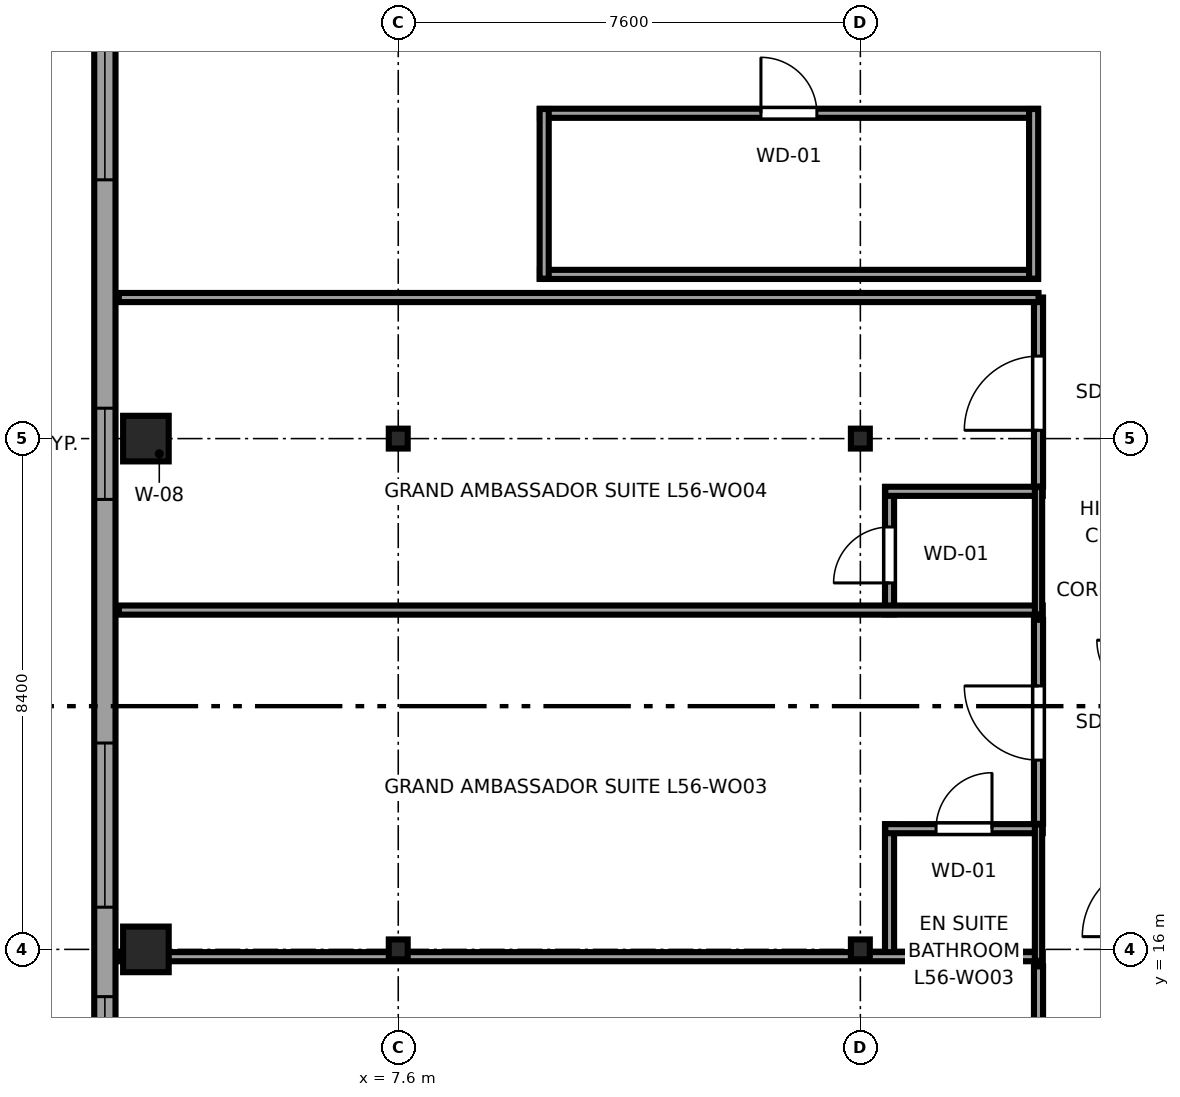
"""IFC4 building model, lengths in metres.
Left out: names, types, materials, properties, quantities, classifications, styles, units other than length and angle.
Written with IfcOpenShell. Run it as: python <this file> out.ifc"""

import sys

from ifc_helpers import new_model, si_unit, direction, frame, frame_2d, origin, origin_2d, place, context, subcontext, project, spatial, rectangle, i_section, extrude, source, transform, mapped, element, fill, save


model = new_model("IFC4")
c1 = context("Model", 3, precision=1e-05, world=origin(), true_north=direction((0.0, 1.0)))
c2 = subcontext(c1, "Body", "Model", "MODEL_VIEW")
j1 = project(units=[si_unit("LENGTHUNIT", "METRE"), si_unit("PLANEANGLEUNIT", "RADIAN")], contexts=[c1])
p1 = place(None, origin())
s1 = spatial("IfcSite", under=j1, at=p1, CompositionType="ELEMENT")
p2 = place(p1, origin())
s2 = spatial("IfcBuilding", under=s1, at=p2, CompositionType="ELEMENT")
p3 = place(p2, frame((0.0, 0.0, 213.25)))
s3 = spatial("IfcBuildingStorey", under=s2, at=p3, CompositionType="ELEMENT", Elevation=213.25)
m1 = source(origin(), c2, "Body", "SweptSolid", [
    extrude(rectangle(XDim=0.75, YDim=0.75, at=origin_2d()), origin(), (0.0, 0.0, 1.0), 3.55),
])
for number, where, z_axis, x_axis in (
    (1, (3.45, 16.0, 0.0), (0.0, 0.0, 1.0), (1.0, 0.0, 0.0)),
    (2, (3.45, 24.4, 0.0), (0.0, 0.0, 1.0), (1.0, 0.0, 0.0)),
):
    element("IfcColumn", number, at=place(p3, frame(where, z_axis=z_axis, x_axis=x_axis)), inside=s3, PredefinedType="COLUMN", context=c2, shape_type="MappedRepresentation", body=[
        mapped(m1, transform((0.0, 0.0, 0.0), x_axis=(1.0, 0.0, 0.0), y_axis=(0.0, 1.0, 0.0), z_axis=(0.0, 0.0, 1.0), scale=1.0)),
    ])
m2 = source(origin(), c2, "Body", "SweptSolid", [
    extrude(i_section(OverallWidth=0.311, OverallDepth=0.327, WebThickness=0.016, FlangeThickness=0.025, FilletRadius=0.017, at=origin_2d()), origin(), (0.0, 0.0, 1.0), 3.55),
])
for number, where, z_axis, x_axis in (
    (3, (7.6, 16.0, 0.0), (0.0, 0.0, 1.0), (1.0, 0.0, 0.0)),
    (4, (7.6, 24.4, 0.0), (0.0, 0.0, 1.0), (1.0, 0.0, 0.0)),
    (5, (15.2, 16.0, 0.0), (0.0, 0.0, 1.0), (1.0, 0.0, 0.0)),
    (6, (15.2, 24.4, 0.0), (0.0, 0.0, 1.0), (1.0, 0.0, 0.0)),
):
    element("IfcColumn", number, at=place(p3, frame(where, z_axis=z_axis, x_axis=x_axis)), inside=s3, PredefinedType="COLUMN", context=c2, shape_type="MappedRepresentation", body=[
        mapped(m2, transform((0.0, 0.0, 0.0), x_axis=(1.0, 0.0, 0.0), y_axis=(0.0, 1.0, 0.0), z_axis=(0.0, 0.0, 1.0), scale=1.0)),
    ])
p4 = place(p3, frame((2.775, 41.583, 0.0), z_axis=(0.0, 0.0, 1.0), x_axis=(0.0, -1.0, 0.0)))
e7 = element("IfcWall", 7, at=p4, inside=s3, PredefinedType="SOLIDWALL", context=c2, shape_type="SweptSolid", body=[
    extrude(rectangle(XDim=34.566, YDim=0.35, at=frame_2d((17.283, 0.0))), origin(), (0.0, 0.0, 1.0), 3.37),
])
p5 = place(p4, frame((10.227, 0.0, 0.68)))
e8 = element("IfcOpeningElement", 8, at=p5, cuts=e7, PredefinedType="OPENING", context=c2, shape_type="SweptSolid", body=[
    extrude(rectangle(XDim=2.7, YDim=1.95, at=frame_2d((1.35, 0.975))), frame((0.0, 0.185, 0.0), z_axis=(0.0, -1.0, 0.0), x_axis=(1.0, 0.0, 0.0)), (0.0, 0.0, 1.0), 0.37),
])
p6 = place(p4, frame((22.189, 0.0, 0.68)))
e9 = element("IfcOpeningElement", 9, at=p6, cuts=e7, PredefinedType="OPENING", context=c2, shape_type="SweptSolid", body=[
    extrude(rectangle(XDim=2.7, YDim=1.95, at=frame_2d((1.35, 0.975))), frame((0.0, 0.185, 0.0), z_axis=(0.0, -1.0, 0.0), x_axis=(1.0, 0.0, 0.0)), (0.0, 0.0, 1.0), 0.37),
])
p7 = place(p4, frame((26.36, 0.0, 0.68)))
e10 = element("IfcOpeningElement", 10, at=p7, cuts=e7, PredefinedType="OPENING", context=c2, shape_type="SweptSolid", body=[
    extrude(rectangle(XDim=2.7, YDim=1.95, at=frame_2d((1.35, 0.975))), frame((0.0, 0.185, 0.0), z_axis=(0.0, -1.0, 0.0), x_axis=(1.0, 0.0, 0.0)), (0.0, 0.0, 1.0), 0.37),
])
p8 = place(p4, frame((29.48, 0.0, 0.68)))
e11 = element("IfcOpeningElement", 11, at=p8, cuts=e7, PredefinedType="OPENING", context=c2, shape_type="SweptSolid", body=[
    extrude(rectangle(XDim=2.7, YDim=1.95, at=frame_2d((1.35, 0.975))), frame((0.0, 0.185, 0.0), z_axis=(0.0, -1.0, 0.0), x_axis=(1.0, 0.0, 0.0)), (0.0, 0.0, 1.0), 0.37),
])
p9 = place(p4, frame((16.683, 0.0, 0.62)))
e12 = element("IfcOpeningElement", 12, at=p9, cuts=e7, PredefinedType="OPENING", context=c2, shape_type="SweptSolid", body=[
    extrude(rectangle(XDim=1.5, YDim=1.55, at=frame_2d((0.75, 0.775))), frame((0.0, 0.185, 0.0), z_axis=(0.0, -1.0, 0.0), x_axis=(1.0, 0.0, 0.0)), (0.0, 0.0, 1.0), 0.37),
])
p10 = place(p3, frame((15.68, 15.81, 0.0), z_axis=(0.0, 0.0, 1.0), x_axis=(0.0, 1.0, 0.0)))
e13 = element("IfcWall", 13, at=p10, inside=s3, PredefinedType="PARTITIONING", context=c2, shape_type="SweptSolid", body=[
    extrude(rectangle(XDim=2.245, YDim=0.15, at=frame_2d((1.123, 0.0))), origin(), (0.0, 0.0, 1.0), 3.37),
])
p11 = place(p3, frame((3.005, 15.88, 0.0), z_axis=(0.0, 0.0, 1.0), x_axis=(1.0, 0.0, 0.0)))
e14 = element("IfcWall", 14, at=p11, inside=s3, PredefinedType="PARTITIONING", context=c2, shape_type="SweptSolid", body=[
    extrude(rectangle(XDim=15.195, YDim=0.15, at=frame_2d((7.598, 0.0))), origin(), (0.0, 0.0, 1.0), 2.758),
])
p12 = place(p3, frame((15.61, 17.985, 0.0), z_axis=(0.0, 0.0, 1.0), x_axis=(1.0, 0.0, 0.0)))
e15 = element("IfcWall", 15, at=p12, inside=s3, PredefinedType="PARTITIONING", context=c2, shape_type="SweptSolid", body=[
    extrude(rectangle(XDim=2.59, YDim=0.15, at=frame_2d((1.295, 0.0))), origin(), (0.0, 0.0, 1.0), 3.37),
])
p13 = place(p12, frame((0.835, 0.0, 0.0)))
e16 = element("IfcOpeningElement", 16, at=p13, cuts=e15, PredefinedType="OPENING", context=c2, shape_type="SweptSolid", body=[
    extrude(rectangle(XDim=0.92, YDim=2.01, at=frame_2d((0.46, 1.005))), frame((0.0, 0.085, 0.0), z_axis=(0.0, -1.0, 0.0), x_axis=(1.0, 0.0, 0.0)), (0.0, 0.0, 1.0), 0.17),
])
p14 = place(p3, frame((18.13, 15.81, 0.0), z_axis=(0.0, 0.0, 1.0), x_axis=(0.0, 1.0, 0.0)))
e17 = element("IfcWall", 17, at=p14, inside=s3, PredefinedType="PLUMBINGWALL", context=c2, shape_type="SweptSolid", body=[
    extrude(rectangle(XDim=2.245, YDim=0.12, at=frame_2d((1.123, 0.0))), origin(), (0.0, 0.0, 1.0), 3.37),
])
p15 = place(p3, frame((15.68, 21.51, 0.0), z_axis=(0.0, 0.0, 1.0), x_axis=(0.0, 1.0, 0.0)))
e18 = element("IfcWall", 18, at=p15, inside=s3, PredefinedType="PARTITIONING", context=c2, shape_type="SweptSolid", body=[
    extrude(rectangle(XDim=2.093, YDim=0.15, at=frame_2d((1.046, 0.0))), origin(), (0.0, 0.0, 1.0), 3.37),
])
p16 = place(p15, frame((0.517, 0.0, 0.0)))
e19 = element("IfcOpeningElement", 19, at=p16, cuts=e18, PredefinedType="OPENING", context=c2, shape_type="SweptSolid", body=[
    extrude(rectangle(XDim=0.92, YDim=2.01, at=frame_2d((0.46, 1.005))), frame((0.0, 0.085, 0.0), z_axis=(0.0, -1.0, 0.0), x_axis=(1.0, 0.0, 0.0)), (0.0, 0.0, 1.0), 0.17),
])
p17 = place(p3, frame((3.005, 21.58, 0.0), z_axis=(0.0, 0.0, 1.0), x_axis=(1.0, 0.0, 0.0)))
e20 = element("IfcWall", 20, at=p17, inside=s3, PredefinedType="PARTITIONING", context=c2, shape_type="SweptSolid", body=[
    extrude(rectangle(XDim=15.195, YDim=0.15, at=frame_2d((7.598, 0.0))), origin(), (0.0, 0.0, 1.0), 3.37),
])
p18 = place(p3, frame((15.61, 23.533, 0.0), z_axis=(0.0, 0.0, 1.0), x_axis=(1.0, 0.0, 0.0)))
e21 = element("IfcWall", 21, at=p18, inside=s3, PredefinedType="PARTITIONING", context=c2, shape_type="SweptSolid", body=[
    extrude(rectangle(XDim=2.59, YDim=0.15, at=frame_2d((1.295, 0.0))), origin(), (0.0, 0.0, 1.0), 3.37),
])
p19 = place(p3, frame((18.13, 21.51, 0.0), z_axis=(0.0, 0.0, 1.0), x_axis=(0.0, 1.0, 0.0)))
e22 = element("IfcWall", 22, at=p19, inside=s3, PredefinedType="PLUMBINGWALL", context=c2, shape_type="SweptSolid", body=[
    extrude(rectangle(XDim=2.093, YDim=0.12, at=frame_2d((1.046, 0.0))), origin(), (0.0, 0.0, 1.0), 3.37),
])
p20 = place(p3, frame((18.13, 11.01, 0.0), z_axis=(0.0, 0.0, 1.0), x_axis=(0.0, 1.0, 0.0)))
e23 = element("IfcWall", 23, at=p20, inside=s3, PredefinedType="PARTITIONING", context=c2, shape_type="SweptSolid", body=[
    extrude(rectangle(XDim=4.71, YDim=0.15, at=frame_2d((2.355, 0.0))), origin(), (0.0, 0.0, 1.0), 3.37),
])
p21 = place(p20, frame((1.725, 0.0, 0.0)))
e24 = element("IfcOpeningElement", 24, at=p21, cuts=e23, PredefinedType="OPENING", context=c2, shape_type="SweptSolid", body=[
    extrude(rectangle(XDim=1.22, YDim=2.08, at=frame_2d((0.61, 1.04))), frame((0.0, 0.085, 0.0), z_axis=(0.0, -1.0, 0.0), x_axis=(1.0, 0.0, 0.0)), (0.0, 0.0, 1.0), 0.17),
])
p22 = place(p3, frame((18.13, 18.065, 0.0), z_axis=(0.0, 0.0, 1.0), x_axis=(0.0, 1.0, 0.0)))
e25 = element("IfcWall", 25, at=p22, inside=s3, PredefinedType="PARTITIONING", context=c2, shape_type="SweptSolid", body=[
    extrude(rectangle(XDim=3.355, YDim=0.15, at=frame_2d((1.677, 0.0))), origin(), (0.0, 0.0, 1.0), 3.37),
])
p23 = place(p22, frame((1.048, 0.0, 0.0)))
e26 = element("IfcOpeningElement", 26, at=p23, cuts=e25, PredefinedType="OPENING", context=c2, shape_type="SweptSolid", body=[
    extrude(rectangle(XDim=1.22, YDim=2.08, at=frame_2d((0.61, 1.04))), frame((0.0, 0.085, 0.0), z_axis=(0.0, -1.0, 0.0), x_axis=(1.0, 0.0, 0.0)), (0.0, 0.0, 1.0), 0.17),
])
p24 = place(p3, frame((18.13, 23.613, 0.0), z_axis=(0.0, 0.0, 1.0), x_axis=(0.0, 1.0, 0.0)))
e27 = element("IfcWall", 27, at=p24, inside=s3, PredefinedType="PARTITIONING", context=c2, shape_type="SweptSolid", body=[
    extrude(rectangle(XDim=3.107, YDim=0.15, at=frame_2d((1.553, 0.0))), origin(), (0.0, 0.0, 1.0), 3.37),
])
p25 = place(p24, frame((0.924, 0.0, 0.0)))
e28 = element("IfcOpeningElement", 28, at=p25, cuts=e27, PredefinedType="OPENING", context=c2, shape_type="SweptSolid", body=[
    extrude(rectangle(XDim=1.22, YDim=2.08, at=frame_2d((0.61, 1.04))), frame((0.0, 0.085, 0.0), z_axis=(0.0, -1.0, 0.0), x_axis=(1.0, 0.0, 0.0)), (0.0, 0.0, 1.0), 0.17),
])
p26 = place(p3, frame((3.005, 26.72, 0.0), z_axis=(0.0, 0.0, 1.0), x_axis=(1.0, 0.0, 0.0)))
e29 = element("IfcWall", 29, at=p26, inside=s3, PredefinedType="PARTITIONING", context=c2, shape_type="SweptSolid", body=[
    extrude(rectangle(XDim=15.125, YDim=0.15, at=frame_2d((7.562, 0.0))), origin(), (0.0, 0.0, 1.0), 3.37),
])
p27 = place(p3, frame((9.93, 27.1, 0.0), z_axis=(0.0, 0.0, 1.0), x_axis=(1.0, 0.0, 0.0)))
e30 = element("IfcWall", 30, at=p27, inside=s3, PredefinedType="PARTITIONING", context=c2, shape_type="SweptSolid", body=[
    extrude(rectangle(XDim=8.19, YDim=0.15, at=frame_2d((4.095, 0.0))), origin(), (0.0, 0.0, 1.0), 3.37),
])
p28 = place(p3, frame((9.93, 29.75, 0.0), z_axis=(0.0, 0.0, 1.0), x_axis=(1.0, 0.0, 0.0)))
e31 = element("IfcWall", 31, at=p28, inside=s3, PredefinedType="PARTITIONING", context=c2, shape_type="SweptSolid", body=[
    extrude(rectangle(XDim=8.19, YDim=0.15, at=frame_2d((4.095, 0.0))), origin(), (0.0, 0.0, 1.0), 3.37),
])
p29 = place(p28, frame((3.635, 0.0, 0.0)))
e32 = element("IfcOpeningElement", 32, at=p29, cuts=e31, PredefinedType="OPENING", context=c2, shape_type="SweptSolid", body=[
    extrude(rectangle(XDim=0.92, YDim=2.01, at=frame_2d((0.46, 1.005))), frame((0.0, 0.085, 0.0), z_axis=(0.0, -1.0, 0.0), x_axis=(1.0, 0.0, 0.0)), (0.0, 0.0, 1.0), 0.17),
])
for number, where, z_axis, x_axis in (
    (33, (10.0, 27.03, 0.0), (0.0, 0.0, 1.0), (0.0, 1.0, 0.0)),
    (34, (18.05, 27.03, 0.0), (0.0, 0.0, 1.0), (0.0, 1.0, 0.0)),
):
    element("IfcWall", number, at=place(p3, frame(where, z_axis=z_axis, x_axis=x_axis)), inside=s3, PredefinedType="PARTITIONING", context=c2, shape_type="SweptSolid", body=[
        extrude(rectangle(XDim=2.79, YDim=0.15, at=frame_2d((1.395, 0.0))), origin(), (0.0, 0.0, 1.0), 3.37),
    ])
m3 = source(origin(), c2, "Body", "SweptSolid", [
    extrude(rectangle(XDim=2.7, YDim=1.95, at=frame_2d((1.35, 0.975))), frame((0.0, 0.09, 0.0), z_axis=(0.0, -1.0, 0.0), x_axis=(1.0, 0.0, 0.0)), (0.0, 0.0, 1.0), 0.06),
])
p30 = place(p5, origin())
e35 = element("IfcWindow", 35, at=p30, inside=s3, PartitioningType="TRIPLE_PANEL_HORIZONTAL", PredefinedType="WINDOW", context=c2, shape_type="MappedRepresentation", body=[
    mapped(m3, transform((0.0, 0.0, 0.0), x_axis=(1.0, 0.0, 0.0), y_axis=(0.0, 1.0, 0.0), z_axis=(0.0, 0.0, 1.0), scale=1.0)),
])
fill(e8, e35)
p31 = place(p6, origin())
e36 = element("IfcWindow", 36, at=p31, inside=s3, PartitioningType="TRIPLE_PANEL_HORIZONTAL", PredefinedType="WINDOW", context=c2, shape_type="MappedRepresentation", body=[
    mapped(m3, transform((0.0, 0.0, 0.0), x_axis=(1.0, 0.0, 0.0), y_axis=(0.0, 1.0, 0.0), z_axis=(0.0, 0.0, 1.0), scale=1.0)),
])
fill(e9, e36)
p32 = place(p7, origin())
e37 = element("IfcWindow", 37, at=p32, inside=s3, PartitioningType="TRIPLE_PANEL_HORIZONTAL", PredefinedType="WINDOW", context=c2, shape_type="MappedRepresentation", body=[
    mapped(m3, transform((0.0, 0.0, 0.0), x_axis=(1.0, 0.0, 0.0), y_axis=(0.0, 1.0, 0.0), z_axis=(0.0, 0.0, 1.0), scale=1.0)),
])
fill(e10, e37)
m4 = source(origin(), c2, "Body", "SweptSolid", [
    extrude(rectangle(XDim=1.5, YDim=1.55, at=frame_2d((0.75, 0.775))), frame((0.0, 0.09, 0.0), z_axis=(0.0, -1.0, 0.0), x_axis=(1.0, 0.0, 0.0)), (0.0, 0.0, 1.0), 0.06),
])
p33 = place(p9, origin())
e38 = element("IfcWindow", 38, at=p33, inside=s3, PartitioningType="SINGLE_PANEL", PredefinedType="WINDOW", context=c2, shape_type="MappedRepresentation", body=[
    mapped(m4, transform((0.0, 0.0, 0.0), x_axis=(1.0, 0.0, 0.0), y_axis=(0.0, 1.0, 0.0), z_axis=(0.0, 0.0, 1.0), scale=1.0)),
])
fill(e12, e38)
m5 = source(origin(), c2, "Body", "SweptSolid", [
    extrude(rectangle(XDim=0.92, YDim=2.01, at=frame_2d((0.46, 1.005))), frame((0.0, 0.025, 0.0), z_axis=(0.0, -1.0, 0.0), x_axis=(1.0, 0.0, 0.0)), (0.0, 0.0, 1.0), 0.05),
])
p34 = place(p13, origin())
e39 = element("IfcDoor", 39, at=p34, inside=s3, OperationType="SINGLE_SWING_RIGHT", PredefinedType="DOOR", context=c2, shape_type="MappedRepresentation", body=[
    mapped(m5, transform((0.0, 0.0, 0.0), x_axis=(1.0, 0.0, 0.0), y_axis=(0.0, 1.0, 0.0), z_axis=(0.0, 0.0, 1.0), scale=1.0)),
])
fill(e16, e39)
p35 = place(p16, origin())
e40 = element("IfcDoor", 40, at=p35, inside=s3, OperationType="SINGLE_SWING_LEFT", PredefinedType="DOOR", context=c2, shape_type="MappedRepresentation", body=[
    mapped(m5, transform((0.0, 0.0, 0.0), x_axis=(1.0, 0.0, 0.0), y_axis=(0.0, 1.0, 0.0), z_axis=(0.0, 0.0, 1.0), scale=1.0)),
])
fill(e19, e40)
m6 = source(origin(), c2, "Body", "SweptSolid", [
    extrude(rectangle(XDim=1.22, YDim=2.08, at=frame_2d((0.61, 1.04))), frame((0.0, 0.025, 0.0), z_axis=(0.0, -1.0, 0.0), x_axis=(1.0, 0.0, 0.0)), (0.0, 0.0, 1.0), 0.05),
])
p36 = place(p23, origin())
e41 = element("IfcDoor", 41, at=p36, inside=s3, OperationType="SINGLE_SWING_RIGHT", PredefinedType="DOOR", context=c2, shape_type="MappedRepresentation", body=[
    mapped(m6, transform((0.0, 0.0, 0.0), x_axis=(1.0, 0.0, 0.0), y_axis=(0.0, 1.0, 0.0), z_axis=(0.0, 0.0, 1.0), scale=1.0)),
])
fill(e26, e41)
p37 = place(p25, origin())
e42 = element("IfcDoor", 42, at=p37, inside=s3, OperationType="SINGLE_SWING_LEFT", PredefinedType="DOOR", context=c2, shape_type="MappedRepresentation", body=[
    mapped(m6, transform((0.0, 0.0, 0.0), x_axis=(1.0, 0.0, 0.0), y_axis=(0.0, 1.0, 0.0), z_axis=(0.0, 0.0, 1.0), scale=1.0)),
])
fill(e28, e42)
p38 = place(p29, origin())
e43 = element("IfcDoor", 43, at=p38, inside=s3, OperationType="SINGLE_SWING_LEFT", PredefinedType="DOOR", context=c2, shape_type="MappedRepresentation", body=[
    mapped(m5, transform((0.0, 0.0, 0.0), x_axis=(1.0, 0.0, 0.0), y_axis=(0.0, 1.0, 0.0), z_axis=(0.0, 0.0, 1.0), scale=1.0)),
])
fill(e32, e43)
save(model, sys.argv[1])
